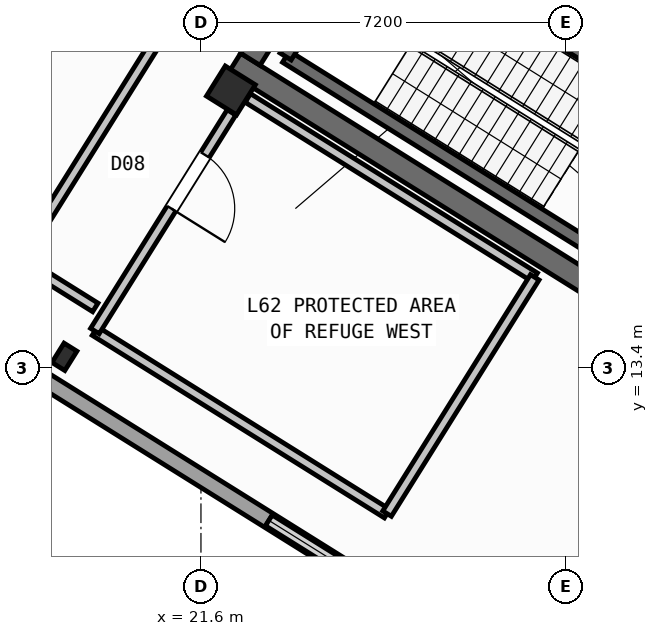
"""IFC4 building model, lengths in metres.
Left out: names, types, materials, properties, quantities, classifications, styles, units other than length and angle.
Written with IfcOpenShell. Run it as: python <this file> out.ifc"""

import sys

from ifc_helpers import new_model, si_unit, direction, frame, frame_2d, origin, origin_2d, place, context, subcontext, project, spatial, rectangle, hollow_rectangle, i_section, extrude, source, transform, mapped, element, fill, save


model = new_model("IFC4")
c1 = context("Model", 3, precision=1e-05, world=origin(), true_north=direction((0.0, 1.0)))
c2 = subcontext(c1, "Body", "Model", "MODEL_VIEW")
j1 = project(units=[si_unit("LENGTHUNIT", "METRE"), si_unit("PLANEANGLEUNIT", "RADIAN")], contexts=[c1])
p1 = place(None, origin())
s1 = spatial("IfcSite", under=j1, at=p1, CompositionType="ELEMENT")
p2 = place(p1, origin())
s2 = spatial("IfcBuilding", under=s1, at=p2, CompositionType="ELEMENT")
p3 = place(p2, frame((0.0, 0.0, 245.7)))
s3 = spatial("IfcBuildingStorey", under=s2, at=p3, CompositionType="ELEMENT", Elevation=245.7)
p4 = place(p3, frame((33.324, 12.503, 0.0), z_axis=(0.0, 0.0, 1.0), x_axis=(-0.848043529849, 0.529926571782, 0.0)))
e1 = element("IfcWall", 1, at=p4, inside=s3, PredefinedType="SHEAR", context=c2, shape_type="SweptSolid", body=[
    extrude(rectangle(XDim=13.04, YDim=0.45, at=frame_2d((6.52, 0.0))), origin(), (0.0, 0.0, 1.0), 5.15),
])
p5 = place(p3, frame((26.007, 24.976, 0.0), z_axis=(0.0, 0.0, 1.0), x_axis=(-0.529931155655, -0.848040665456, 0.0)))
e2 = element("IfcWall", 2, at=p5, inside=s3, PredefinedType="SHEAR", context=c2, shape_type="SweptSolid", body=[
    extrude(rectangle(XDim=6.475, YDim=0.45, at=frame_2d((3.238, 0.0))), origin(), (0.0, 0.0, 1.0), 5.15),
])
m1 = source(origin(), c2, "Body", "SweptSolid", [
    extrude(hollow_rectangle(XDim=0.7, YDim=0.7, WallThickness=0.028, at=origin_2d()), origin(), (0.0, 0.0, 1.0), 5.4),
])
p6 = place(p3, frame((22.191, 18.87, 0.0), z_axis=(0.0, 0.0, 1.0), x_axis=(-0.848048096156, 0.529919264233, 0.0)))
e3 = element("IfcColumn", 3, at=p6, inside=s3, PredefinedType="COLUMN", context=c2, shape_type="MappedRepresentation", body=[
    mapped(m1, transform((0.0, 0.0, 0.0), scale=1.0)),
])
m2 = source(origin(), c2, "Body", "SweptSolid", [
    extrude(i_section(OverallWidth=0.3, OverallDepth=0.45, WebThickness=0.014, FlangeThickness=0.026, at=origin_2d()), origin(), (0.0, 0.0, 1.0), 5.4),
])
p7 = place(p3, frame((18.906, 13.612, 0.0), z_axis=(0.0, 0.0, 1.0), x_axis=(-0.848048096156, 0.529919264233, 0.0)))
e4 = element("IfcColumn", 4, at=p7, inside=s3, PredefinedType="COLUMN", context=c2, shape_type="MappedRepresentation", body=[
    mapped(m2, transform((0.0, 0.0, 0.0), scale=1.0)),
])
p8 = place(p3, frame((29.268, 6.429, 0.0), z_axis=(0.0, 0.0, 1.0), x_axis=(-0.848049971435, 0.529916263149, 0.0)))
e5 = element("IfcWall", 5, at=p8, inside=s3, PredefinedType="STANDARD", context=c2, shape_type="SweptSolid", body=[
    extrude(rectangle(XDim=31.588, YDim=0.32, at=frame_2d((15.794, 0.0))), origin(), (0.0, 0.0, 1.0), 5.15),
])
p9 = place(p8, frame((5.782, 0.0, 0.85)))
e6 = element("IfcOpeningElement", 6, at=p9, cuts=e5, PredefinedType="OPENING", context=c2, shape_type="SweptSolid", body=[
    extrude(rectangle(XDim=1.7, YDim=1.6, at=frame_2d((0.85, 0.8))), frame((0.0, 0.17, 0.0), z_axis=(0.0, -1.0, 0.0), x_axis=(1.0, 0.0, 0.0)), (0.0, 0.0, 1.0), 0.34),
])
p10 = place(p3, frame((29.605, 15.581, 0.0), z_axis=(0.0, 0.0, 1.0), x_axis=(-0.848036911448, 0.529937163087, 0.0)))
e7 = element("IfcWall", 7, at=p10, inside=s3, PredefinedType="SHEAR", context=c2, shape_type="SweptSolid", body=[
    extrude(rectangle(XDim=7.46, YDim=0.26, at=frame_2d((3.73, 0.0))), origin(), (0.0, 0.0, 1.0), 5.15),
])
p11 = place(p3, frame((31.28, 18.261, 0.0), z_axis=(0.0, 0.0, 1.0), x_axis=(-0.848051618787, 0.529913626805, 0.0)))
e8 = element("IfcWall", 8, at=p11, inside=s3, PredefinedType="SHEAR", context=c2, shape_type="SweptSolid", body=[
    extrude(rectangle(XDim=7.46, YDim=0.26, at=frame_2d((3.73, 0.0))), origin(), (0.0, 0.0, 1.0), 5.15),
])
p12 = place(p11, frame((0.36, 0.0, 0.0)))
e9 = element("IfcOpeningElement", 9, at=p12, cuts=e8, PredefinedType="OPENING", context=c2, shape_type="SweptSolid", body=[
    extrude(rectangle(XDim=0.86, YDim=2.05, at=frame_2d((0.43, 1.025))), frame((0.0, 0.14, 0.0), z_axis=(0.0, -1.0, 0.0), x_axis=(1.0, 0.0, 0.0)), (0.0, 0.0, 1.0), 0.28),
])
p13 = place(p3, frame((24.945, 22.22, 0.0), z_axis=(0.0, 0.0, 1.0), x_axis=(-0.529908658664, -0.84805472316, 0.0)))
e10 = element("IfcWall", 10, at=p13, inside=s3, PredefinedType="SHEAR", context=c2, shape_type="SweptSolid", body=[
    extrude(rectangle(XDim=3.16, YDim=0.26, at=frame_2d((1.58, 0.0))), origin(), (0.0, 0.0, 1.0), 5.15),
])
p14 = place(p3, frame((28.188, 15.182, 0.0), z_axis=(0.0, 0.0, 1.0), x_axis=(-0.848049646362, 0.529916783378, 0.0)))
e11 = element("IfcWall", 11, at=p14, inside=s3, PredefinedType="STANDARD", context=c2, shape_type="SweptSolid", body=[
    extrude(rectangle(XDim=6.678, YDim=0.2, at=frame_2d((3.339, 0.0))), origin(), (0.0, 0.0, 1.0), 5.14),
])
p15 = place(p3, frame((25.273, 10.517, 0.0), z_axis=(0.0, 0.0, 1.0), x_axis=(-0.848048724775, 0.529918258231, 0.0)))
e12 = element("IfcWall", 12, at=p15, inside=s3, PredefinedType="STANDARD", context=c2, shape_type="SweptSolid", body=[
    extrude(rectangle(XDim=6.8, YDim=0.2, at=frame_2d((3.4, 0.0))), origin(), (0.0, 0.0, 1.0), 5.14),
])
p16 = place(p3, frame((28.188, 15.182, 0.0), z_axis=(0.0, 0.0, 1.0), x_axis=(-0.52991514706, -0.848050668838, 0.0)))
e13 = element("IfcWall", 13, at=p16, inside=s3, PredefinedType="STANDARD", context=c2, shape_type="SweptSolid", body=[
    extrude(rectangle(XDim=5.5, YDim=0.2, at=frame_2d((2.75, 0.0))), origin(), (0.0, 0.0, 1.0), 5.14),
])
p17 = place(p3, frame((22.203, 18.436, 0.0), z_axis=(0.0, 0.0, 1.0), x_axis=(-0.529921302798, -0.848046822316, 0.0)))
e14 = element("IfcWall", 14, at=p17, inside=s3, PredefinedType="STANDARD", context=c2, shape_type="SweptSolid", body=[
    extrude(rectangle(XDim=5.088, YDim=0.2, at=frame_2d((2.544, 0.0))), origin(), (0.0, 0.0, 1.0), 4.675),
])
p18 = place(p17, frame((0.988, 0.0, 0.0)))
e15 = element("IfcOpeningElement", 15, at=p18, cuts=e14, PredefinedType="OPENING", context=c2, shape_type="SweptSolid", body=[
    extrude(rectangle(XDim=1.25, YDim=2.15, at=frame_2d((0.625, 1.075))), frame((0.0, 0.11, 0.0), z_axis=(0.0, -1.0, 0.0), x_axis=(1.0, 0.0, 0.0)), (0.0, 0.0, 1.0), 0.22),
])
p19 = place(p3, frame((19.515, 14.587, 0.0), z_axis=(0.0, 0.0, 1.0), x_axis=(-0.848076222107, 0.529874250646, 0.0)))
e16 = element("IfcWall", 16, at=p19, inside=s3, PredefinedType="STANDARD", context=c2, shape_type="SweptSolid", body=[
    extrude(rectangle(XDim=1.76, YDim=0.2, at=frame_2d((0.88, 0.0))), origin(), (0.0, 0.0, 1.0), 5.14),
])
p20 = place(p3, frame((23.666, 24.552, 0.0), z_axis=(0.0, 0.0, 1.0), x_axis=(-0.529912392506, -0.848052390049, 0.0)))
e17 = element("IfcWall", 17, at=p20, inside=s3, PredefinedType="STANDARD", context=c2, shape_type="SweptSolid", body=[
    extrude(rectangle(XDim=10.65, YDim=0.2, at=frame_2d((5.325, 0.0))), origin(), (0.0, 0.0, 1.0), 5.14),
])
m3 = source(origin(), c2, "Body", "SweptSolid", [
    extrude(rectangle(XDim=1.7, YDim=1.6, at=frame_2d((0.85, 0.8))), frame((0.0, 0.03, 0.0), z_axis=(0.0, -1.0, 0.0), x_axis=(1.0, 0.0, 0.0)), (0.0, 0.0, 1.0), 0.06),
])
p21 = place(p9, origin())
e18 = element("IfcWindow", 18, at=p21, inside=s3, PartitioningType="SINGLE_PANEL", PredefinedType="WINDOW", context=c2, shape_type="MappedRepresentation", body=[
    mapped(m3, transform((0.0, 0.0, 0.0), scale=1.0)),
])
fill(e6, e18)
m4 = source(origin(), c2, "Body", "SweptSolid", [
    extrude(rectangle(XDim=1.25, YDim=2.15, at=frame_2d((0.625, 1.075))), frame((0.0, 0.025, 0.0), z_axis=(0.0, -1.0, 0.0), x_axis=(1.0, 0.0, 0.0)), (0.0, 0.0, 1.0), 0.05),
])
p22 = place(p18, origin())
e19 = element("IfcDoor", 19, at=p22, inside=s3, OperationType="SINGLE_SWING_RIGHT", PredefinedType="DOOR", context=c2, shape_type="MappedRepresentation", body=[
    mapped(m4, transform((0.0, 0.0, 0.0), scale=1.0)),
])
fill(e15, e19)
save(model, sys.argv[1])
